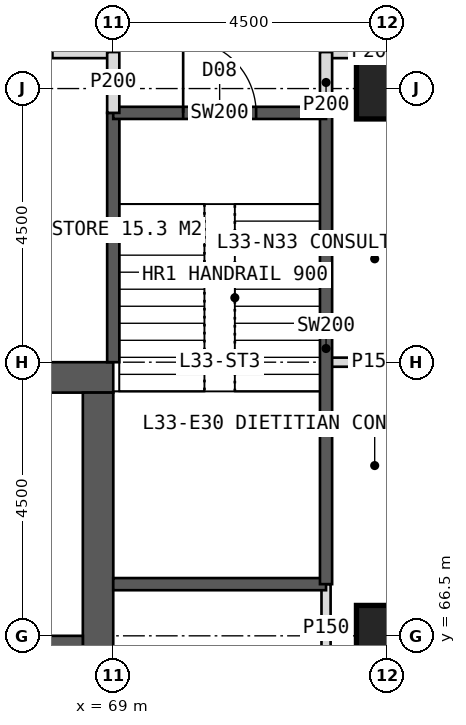
"""IFC4 building model, lengths in metres.
Left out: names, types, materials, properties, quantities, classifications, styles, units other than length and angle.
Written with IfcOpenShell. Run it as: python <this file> out.ifc"""

import sys

from ifc_helpers import new_model, si_unit, direction, frame, frame_2d, origin, origin_2d, place, context, subcontext, project, spatial, rectangle, hollow_rectangle, extrude, element, fill, save


model = new_model("IFC4")
c1 = context("Model", 3, precision=1e-05, world=origin(), true_north=direction((0.0, 1.0)))
c2 = subcontext(c1, "Body", "Model", "MODEL_VIEW")
j1 = project(units=[si_unit("LENGTHUNIT", "METRE"), si_unit("PLANEANGLEUNIT", "RADIAN")], contexts=[c1])
p1 = place(None, origin())
s1 = spatial("IfcSite", under=j1, at=p1, CompositionType="ELEMENT")
p2 = place(p1, origin())
s2 = spatial("IfcBuilding", under=s1, at=p2, CompositionType="ELEMENT")
p3 = place(p2, frame((0.0, 0.0, 140.0)))
s3 = spatial("IfcBuildingStorey", under=s2, at=p3, CompositionType="ELEMENT", Elevation=140.0)
p4 = place(p3, frame((51.0, 70.75, 0.0), z_axis=(0.0, 0.0, 1.0), x_axis=(1.0, 0.0, 0.0)))
e1 = element("IfcWall", 1, at=p4, inside=s3, PredefinedType="SHEAR", context=c2, shape_type="SweptSolid", body=[
    extrude(rectangle(XDim=18.0, YDim=0.5, at=frame_2d((9.0, 0.0))), origin(), (0.0, 0.0, 1.0), 4.0),
])
p5 = place(p4, frame((8.1, 0.0, 0.0)))
e2 = element("IfcOpeningElement", 2, at=p5, cuts=e1, PredefinedType="OPENING", context=c2, shape_type="SweptSolid", body=[
    extrude(rectangle(XDim=1.8, YDim=2.2, at=frame_2d((0.9, 1.1))), frame((0.0, 0.26, 0.0), z_axis=(0.0, -1.0, 0.0), x_axis=(1.0, 0.0, 0.0)), (0.0, 0.0, 1.0), 0.52),
])
p6 = place(p3, frame((68.75, 53.5, 0.0), z_axis=(0.0, 0.0, 1.0), x_axis=(0.0, 1.0, 0.0)))
e3 = element("IfcWall", 3, at=p6, inside=s3, PredefinedType="SHEAR", context=c2, shape_type="SweptSolid", body=[
    extrude(rectangle(XDim=17.0, YDim=0.5, at=frame_2d((8.5, 0.0))), origin(), (0.0, 0.0, 1.0), 4.0),
])
p7 = place(p6, frame((9.5, 0.0, 0.0)))
e4 = element("IfcOpeningElement", 4, at=p7, cuts=e3, PredefinedType="OPENING", context=c2, shape_type="SweptSolid", body=[
    extrude(rectangle(XDim=1.5, YDim=2.2, at=frame_2d((0.75, 1.1))), frame((0.0, 0.26, 0.0), z_axis=(0.0, -1.0, 0.0), x_axis=(1.0, 0.0, 0.0)), (0.0, 0.0, 1.0), 0.52),
])
p8 = place(p3, frame((65.2, 66.35, 0.0), z_axis=(0.0, 0.0, 1.0), x_axis=(1.0, 0.0, 0.0)))
e5 = element("IfcWall", 5, at=p8, inside=s3, PredefinedType="SHEAR", context=c2, shape_type="SweptSolid", body=[
    extrude(rectangle(XDim=3.3, YDim=0.3, at=frame_2d((1.65, 0.0))), origin(), (0.0, 0.0, 1.0), 4.0),
])
p9 = place(p8, frame((1.05, 0.0, 0.0)))
e6 = element("IfcOpeningElement", 6, at=p9, cuts=e5, PredefinedType="OPENING", context=c2, shape_type="SweptSolid", body=[
    extrude(rectangle(XDim=1.2, YDim=2.2, at=frame_2d((0.6, 1.1))), frame((0.0, 0.16, 0.0), z_axis=(0.0, -1.0, 0.0), x_axis=(1.0, 0.0, 0.0)), (0.0, 0.0, 1.0), 0.32),
])
for number, where, z_axis, x_axis in (
    (7, (73.5, 75.5, 0.0), (0.0, 0.0, 1.0), (1.0, 0.0, 0.0)),
    (8, (73.5, 66.5, 0.0), (0.0, 0.0, 1.0), (1.0, 0.0, 0.0)),
):
    element("IfcColumn", number, at=place(p3, frame(where, z_axis=z_axis, x_axis=x_axis)), inside=s3, PredefinedType="COLUMN", context=c2, shape_type="SweptSolid", body=[
        extrude(hollow_rectangle(XDim=1.0, YDim=1.0, WallThickness=0.1, at=origin_2d()), origin(), (0.0, 0.0, 1.0), 4.0),
    ])
p10 = place(p3, frame((62.25, 76.1, 0.0), z_axis=(0.0, 0.0, 1.0), x_axis=(1.0, 0.0, 0.0)))
e9 = element("IfcWall", 9, at=p10, inside=s3, PredefinedType="PARTITIONING", context=c2, shape_type="SweptSolid", body=[
    extrude(rectangle(XDim=6.75, YDim=0.2, at=frame_2d((3.375, 0.0))), origin(), (0.0, 0.0, 1.0), 3.75),
])
p11 = place(p10, frame((0.325, 0.0, 0.0)))
e10 = element("IfcOpeningElement", 10, at=p11, cuts=e9, PredefinedType="OPENING", context=c2, shape_type="SweptSolid", body=[
    extrude(rectangle(XDim=1.0, YDim=2.1, at=frame_2d((0.5, 1.05))), frame((0.0, 0.11, 0.0), z_axis=(0.0, -1.0, 0.0), x_axis=(1.0, 0.0, 0.0)), (0.0, 0.0, 1.0), 0.22),
])
p12 = place(p10, frame((4.75, 0.0, 0.0)))
e11 = element("IfcOpeningElement", 11, at=p12, cuts=e9, PredefinedType="OPENING", context=c2, shape_type="SweptSolid", body=[
    extrude(rectangle(XDim=1.0, YDim=2.1, at=frame_2d((0.5, 1.05))), frame((0.0, 0.11, 0.0), z_axis=(0.0, -1.0, 0.0), x_axis=(1.0, 0.0, 0.0)), (0.0, 0.0, 1.0), 0.22),
])
p13 = place(p3, frame((72.5, 76.1, 0.0), z_axis=(0.0, 0.0, 1.0), x_axis=(1.0, 0.0, 0.0)))
e12 = element("IfcWall", 12, at=p13, inside=s3, PredefinedType="PARTITIONING", context=c2, shape_type="SweptSolid", body=[
    extrude(rectangle(XDim=1.6, YDim=0.2, at=frame_2d((0.8, 0.0))), origin(), (0.0, 0.0, 1.0), 3.75),
])
p14 = place(p3, frame((72.5, 71.0, 0.0), z_axis=(0.0, 0.0, 1.0), x_axis=(1.0, 0.0, 0.0)))
e13 = element("IfcWall", 13, at=p14, inside=s3, PredefinedType="PARTITIONING", context=c2, shape_type="SweptSolid", body=[
    extrude(rectangle(XDim=1.6, YDim=0.15, at=frame_2d((0.8, 0.0))), origin(), (0.0, 0.0, 1.0), 3.75),
])
p15 = place(p3, frame((72.5, 65.9, 0.0), z_axis=(0.0, 0.0, 1.0), x_axis=(0.0, 1.0, 0.0)))
e14 = element("IfcWall", 14, at=p15, inside=s3, PredefinedType="PARTITIONING", context=c2, shape_type="SweptSolid", body=[
    extrude(rectangle(XDim=1.45, YDim=0.15, at=frame_2d((0.725, 0.0))), origin(), (0.0, 0.0, 1.0), 3.75),
])
p16 = place(p3, frame((69.0, 71.0, 0.0), z_axis=(0.0, 0.0, 1.0), x_axis=(0.0, 1.0, 0.0)))
e15 = element("IfcWall", 15, at=p16, inside=s3, PredefinedType="SOLIDWALL", context=c2, shape_type="SweptSolid", body=[
    extrude(rectangle(XDim=4.1, YDim=0.2, at=frame_2d((2.05, 0.0))), origin(), (0.0, 0.0, 1.0), 3.75),
])
p17 = place(p3, frame((69.0, 67.35, 0.0), z_axis=(0.0, 0.0, 1.0), x_axis=(1.0, 0.0, 0.0)))
e16 = element("IfcWall", 16, at=p17, inside=s3, PredefinedType="SOLIDWALL", context=c2, shape_type="SweptSolid", body=[
    extrude(rectangle(XDim=3.5, YDim=0.2, at=frame_2d((1.75, 0.0))), origin(), (0.0, 0.0, 1.0), 3.75),
])
p18 = place(p3, frame((72.5, 67.35, 0.0), z_axis=(0.0, 0.0, 1.0), x_axis=(0.0, 1.0, 0.0)))
e17 = element("IfcWall", 17, at=p18, inside=s3, PredefinedType="SOLIDWALL", context=c2, shape_type="SweptSolid", body=[
    extrude(rectangle(XDim=7.75, YDim=0.2, at=frame_2d((3.875, 0.0))), origin(), (0.0, 0.0, 1.0), 3.75),
])
p19 = place(p3, frame((69.0, 75.1, 0.0), z_axis=(0.0, 0.0, 1.0), x_axis=(1.0, 0.0, 0.0)))
e18 = element("IfcWall", 18, at=p19, inside=s3, PredefinedType="SOLIDWALL", context=c2, shape_type="SweptSolid", body=[
    extrude(rectangle(XDim=3.5, YDim=0.2, at=frame_2d((1.75, 0.0))), origin(), (0.0, 0.0, 1.0), 3.75),
])
p20 = place(p19, frame((1.15, 0.0, 0.0)))
e19 = element("IfcOpeningElement", 19, at=p20, cuts=e18, PredefinedType="OPENING", context=c2, shape_type="SweptSolid", body=[
    extrude(rectangle(XDim=1.2, YDim=2.1, at=frame_2d((0.6, 1.05))), frame((0.0, 0.11, 0.0), z_axis=(0.0, -1.0, 0.0), x_axis=(1.0, 0.0, 0.0)), (0.0, 0.0, 1.0), 0.22),
])
for number, where, z_axis, x_axis in (
    (20, (69.0, 75.1, 0.0), (0.0, 0.0, 1.0), (0.0, 1.0, 0.0)),
    (21, (72.5, 75.1, 0.0), (0.0, 0.0, 1.0), (0.0, 1.0, 0.0)),
):
    element("IfcWall", number, at=place(p3, frame(where, z_axis=z_axis, x_axis=x_axis)), inside=s3, PredefinedType="PARTITIONING", context=c2, shape_type="SweptSolid", body=[
        extrude(rectangle(XDim=1.0, YDim=0.2, at=frame_2d((0.5, 0.0))), origin(), (0.0, 0.0, 1.0), 3.75),
    ])
p21 = place(p20, origin())
e22 = element("IfcDoor", 22, at=p21, inside=s3, OperationType="SINGLE_SWING_LEFT", PredefinedType="DOOR", context=c2, shape_type="SweptSolid", body=[
    extrude(rectangle(XDim=1.2, YDim=2.1, at=frame_2d((0.6, 1.05))), frame((0.0, 0.025, 0.0), z_axis=(0.0, -1.0, 0.0), x_axis=(1.0, 0.0, 0.0)), (0.0, 0.0, 1.0), 0.05),
])
fill(e19, e22)
save(model, sys.argv[1])
